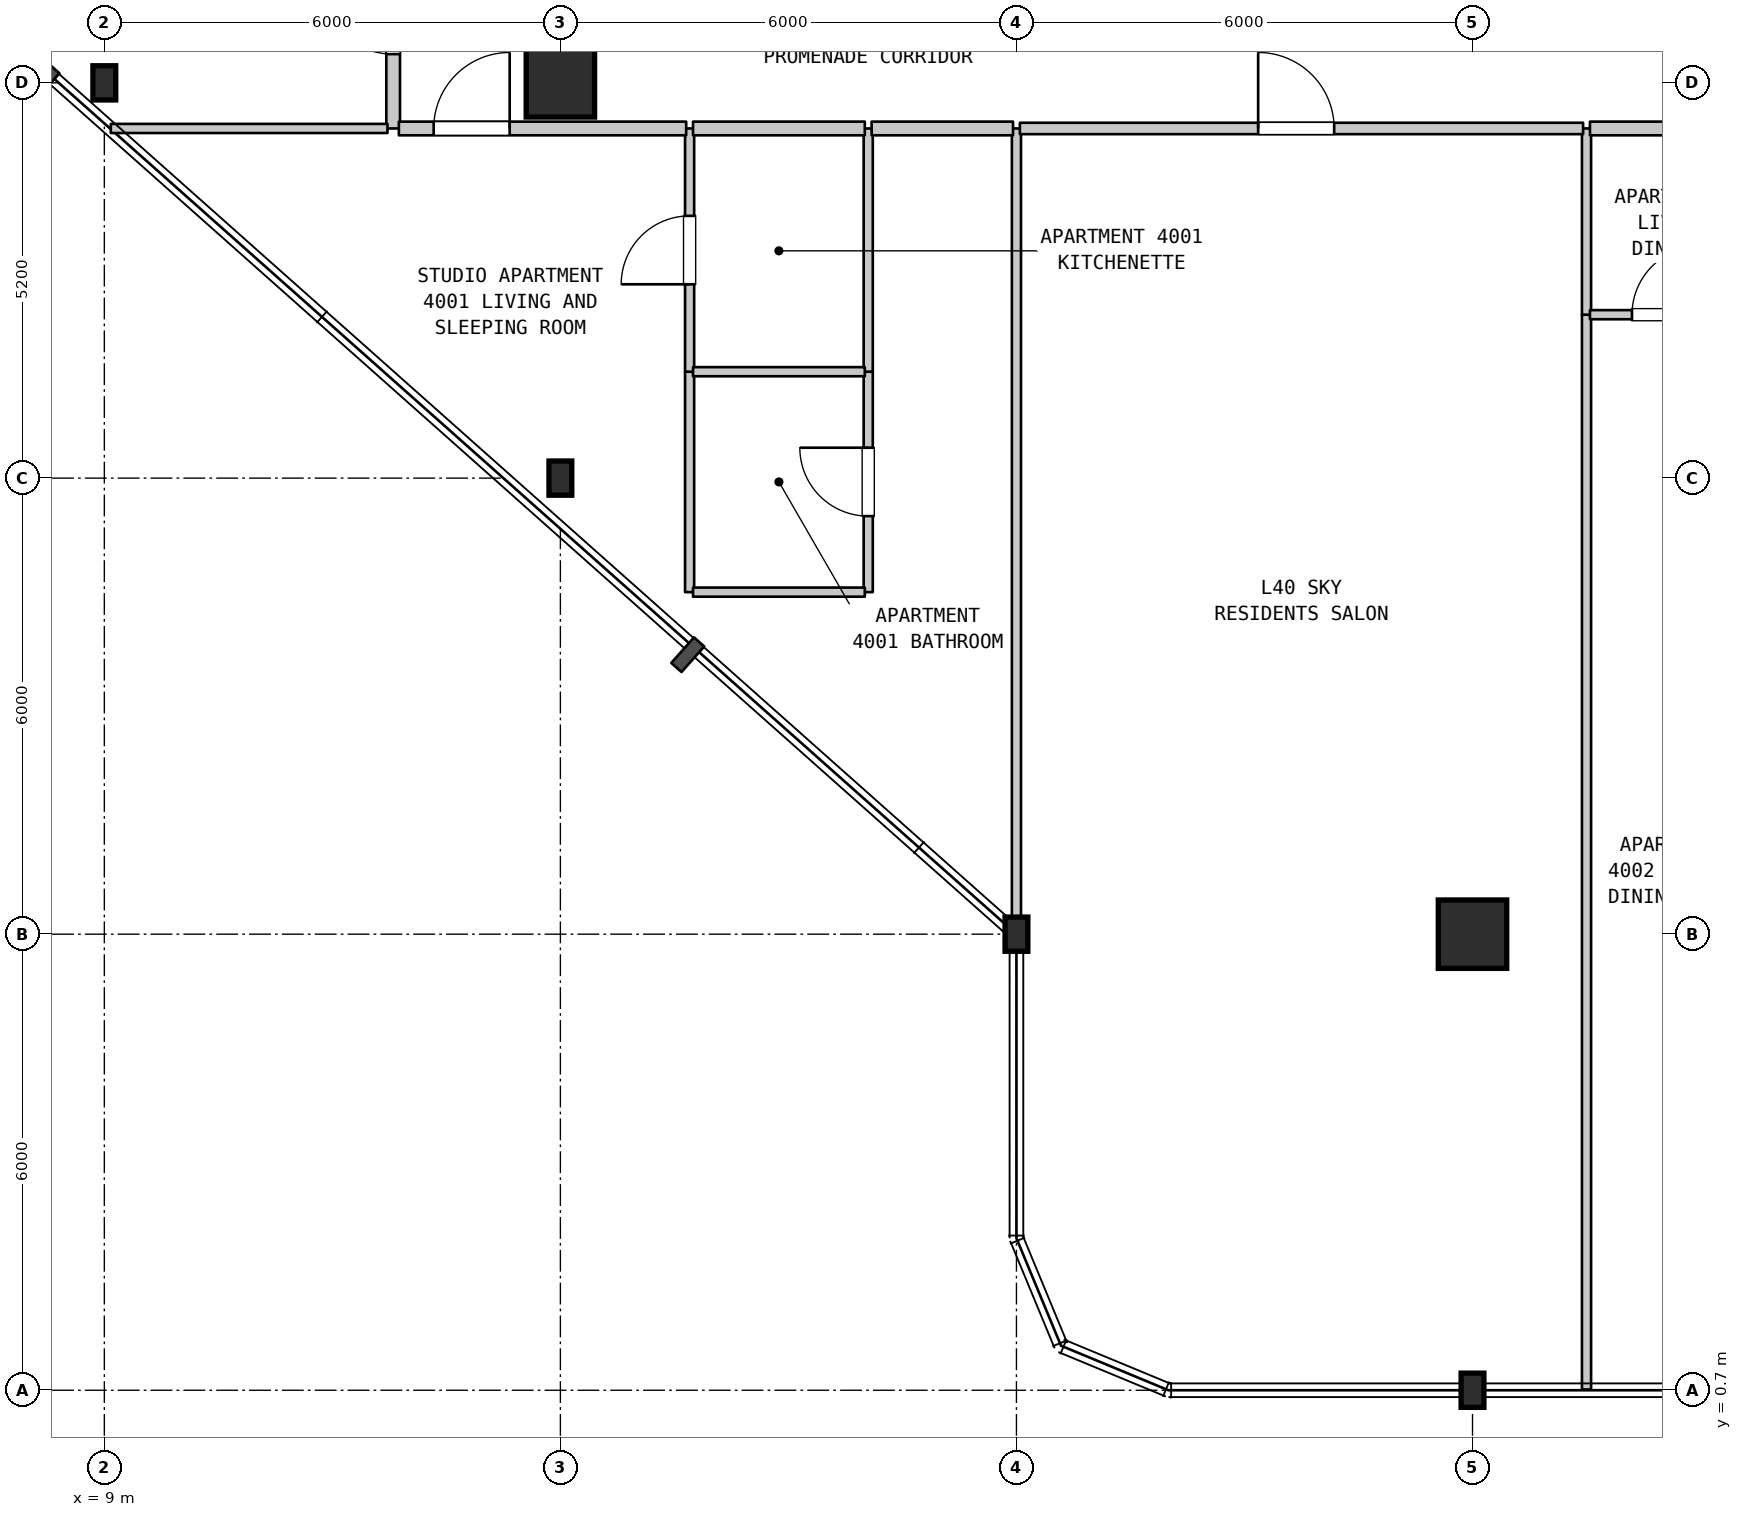
"""IFC4 building model, lengths in metres.
Left out: names, types, materials, properties, quantities, classifications, styles, units other than length and angle.
Written with IfcOpenShell. Run it as: python <this file> out.ifc"""

import sys

from ifc_helpers import new_model, si_unit, direction, frame, frame_2d, origin, origin_2d, place, context, subcontext, project, spatial, rectangle, i_section, extrude, element, fill, save


model = new_model("IFC4")
c1 = context("Model", 3, precision=1e-05, world=origin(), true_north=direction((0.0, 1.0)))
c2 = subcontext(c1, "Body", "Model", "MODEL_VIEW")
j1 = project(units=[si_unit("LENGTHUNIT", "METRE"), si_unit("PLANEANGLEUNIT", "RADIAN")], contexts=[c1])
p1 = place(None, origin())
s1 = spatial("IfcSite", under=j1, at=p1, CompositionType="ELEMENT")
p2 = place(p1, origin())
s2 = spatial("IfcBuilding", under=s1, at=p2, CompositionType="ELEMENT")
p3 = place(p2, frame((0.0, 0.0, 164.6)))
s3 = spatial("IfcBuildingStorey", under=s2, at=p3, CompositionType="ELEMENT", Elevation=164.6)
for number, where, z_axis, x_axis in (
    (1, (9.0, 17.9, 0.0), (0.0, 0.0, 1.0), (1.0, 0.0, 0.0)),
    (2, (15.0, 12.7, 0.0), (0.0, 0.0, 1.0), (1.0, 0.0, 0.0)),
):
    element("IfcColumn", number, at=place(p3, frame(where, z_axis=z_axis, x_axis=x_axis)), inside=s3, PredefinedType="COLUMN", context=c2, shape_type="SweptSolid", body=[
        extrude(i_section(OverallWidth=0.3, OverallDepth=0.45, WebThickness=0.014, FlangeThickness=0.026, FilletRadius=0.027, at=origin_2d()), origin(), (0.0, 0.0, 1.0), 4.5),
    ])
p4 = place(p3, frame((15.0, 17.9, 0.0), z_axis=(0.0, 0.0, 1.0), x_axis=(1.0, 0.0, 0.0)))
e3 = element("IfcColumn", 3, at=p4, inside=s3, PredefinedType="COLUMN", context=c2, shape_type="SweptSolid", body=[
    extrude(rectangle(XDim=0.9, YDim=0.9, at=origin_2d()), origin(), (0.0, 0.0, 1.0), 4.5),
])
for number, where, z_axis, x_axis in (
    (4, (21.0, 6.7, 0.0), (0.0, 0.0, 1.0), (1.0, 0.0, 0.0)),
    (5, (27.0, 0.7, 0.0), (0.0, 0.0, 1.0), (1.0, 0.0, 0.0)),
):
    element("IfcColumn", number, at=place(p3, frame(where, z_axis=z_axis, x_axis=x_axis)), inside=s3, PredefinedType="COLUMN", context=c2, shape_type="SweptSolid", body=[
        extrude(i_section(OverallWidth=0.3, OverallDepth=0.45, WebThickness=0.014, FlangeThickness=0.026, FilletRadius=0.027, at=origin_2d()), origin(), (0.0, 0.0, 1.0), 4.5),
    ])
p5 = place(p3, frame((27.0, 6.7, 0.0), z_axis=(0.0, 0.0, 1.0), x_axis=(1.0, 0.0, 0.0)))
e6 = element("IfcColumn", 6, at=p5, inside=s3, PredefinedType="COLUMN", context=c2, shape_type="SweptSolid", body=[
    extrude(rectangle(XDim=0.9, YDim=0.9, at=origin_2d()), origin(), (0.0, 0.0, 1.0), 4.5),
])
p6 = place(p3, frame((12.8, 17.3, 0.0), z_axis=(0.0, 0.0, 1.0), x_axis=(0.0, 1.0, 0.0)))
e7 = element("IfcWall", 7, at=p6, inside=s3, PredefinedType="STANDARD", context=c2, shape_type="SweptSolid", body=[
    extrude(rectangle(XDim=3.1, YDim=0.18, at=frame_2d((1.55, 0.0))), origin(), (0.0, 0.0, 1.0), 4.19),
])
p7 = place(p6, frame((0.978, 0.0, 0.0)))
e8 = element("IfcOpeningElement", 8, at=p7, cuts=e7, PredefinedType="OPENING", context=c2, shape_type="SweptSolid", body=[
    extrude(rectangle(XDim=1.0, YDim=2.15, at=frame_2d((0.5, 1.075))), frame((0.0, 0.1, 0.0), z_axis=(0.0, -1.0, 0.0), x_axis=(1.0, 0.0, 0.0)), (0.0, 0.0, 1.0), 0.2),
])
p8 = place(p3, frame((16.7, 11.2, 0.0), z_axis=(0.0, 0.0, 1.0), x_axis=(0.0, 1.0, 0.0)))
e9 = element("IfcWall", 9, at=p8, inside=s3, PredefinedType="PARTITIONING", context=c2, shape_type="SweptSolid", body=[
    extrude(rectangle(XDim=2.9, YDim=0.12, at=frame_2d((1.45, 0.0))), origin(), (0.0, 0.0, 1.0), 4.19),
])
p9 = place(p3, frame((16.7, 14.1, 0.0), z_axis=(0.0, 0.0, 1.0), x_axis=(0.0, 1.0, 0.0)))
e10 = element("IfcWall", 10, at=p9, inside=s3, PredefinedType="PARTITIONING", context=c2, shape_type="SweptSolid", body=[
    extrude(rectangle(XDim=3.2, YDim=0.12, at=frame_2d((1.6, 0.0))), origin(), (0.0, 0.0, 1.0), 4.19),
])
p10 = place(p9, frame((1.15, 0.0, 0.0)))
e11 = element("IfcOpeningElement", 11, at=p10, cuts=e10, PredefinedType="OPENING", context=c2, shape_type="SweptSolid", body=[
    extrude(rectangle(XDim=0.9, YDim=2.15, at=frame_2d((0.45, 1.075))), frame((0.0, 0.07, 0.0), z_axis=(0.0, -1.0, 0.0), x_axis=(1.0, 0.0, 0.0)), (0.0, 0.0, 1.0), 0.14),
])
p11 = place(p3, frame((19.05, 11.2, 0.0), z_axis=(0.0, 0.0, 1.0), x_axis=(0.0, 1.0, 0.0)))
e12 = element("IfcWall", 12, at=p11, inside=s3, PredefinedType="PARTITIONING", context=c2, shape_type="SweptSolid", body=[
    extrude(rectangle(XDim=2.9, YDim=0.12, at=frame_2d((1.45, 0.0))), origin(), (0.0, 0.0, 1.0), 4.19),
])
p12 = place(p11, frame((1.0, 0.0, 0.0)))
e13 = element("IfcOpeningElement", 13, at=p12, cuts=e12, PredefinedType="OPENING", context=c2, shape_type="SweptSolid", body=[
    extrude(rectangle(XDim=0.9, YDim=2.1, at=frame_2d((0.45, 1.05))), frame((0.0, 0.07, 0.0), z_axis=(0.0, -1.0, 0.0), x_axis=(1.0, 0.0, 0.0)), (0.0, 0.0, 1.0), 0.14),
])
p13 = place(p3, frame((19.05, 14.1, 0.0), z_axis=(0.0, 0.0, 1.0), x_axis=(0.0, 1.0, 0.0)))
e14 = element("IfcWall", 14, at=p13, inside=s3, PredefinedType="PARTITIONING", context=c2, shape_type="SweptSolid", body=[
    extrude(rectangle(XDim=3.2, YDim=0.12, at=frame_2d((1.6, 0.0))), origin(), (0.0, 0.0, 1.0), 4.19),
])
p14 = place(p3, frame((21.0, 6.71, 0.0), z_axis=(0.0, 0.0, 1.0), x_axis=(0.0, 1.0, 0.0)))
e15 = element("IfcWall", 15, at=p14, inside=s3, PredefinedType="PARTITIONING", context=c2, shape_type="SweptSolid", body=[
    extrude(rectangle(XDim=10.59, YDim=0.12, at=frame_2d((5.295, 0.0))), origin(), (0.0, 0.0, 1.0), 4.19),
])
p15 = place(p3, frame((28.5, 0.71, 0.0), z_axis=(0.0, 0.0, 1.0), x_axis=(0.0, 1.0, 0.0)))
e16 = element("IfcWall", 16, at=p15, inside=s3, PredefinedType="PARTITIONING", context=c2, shape_type="SweptSolid", body=[
    extrude(rectangle(XDim=14.14, YDim=0.12, at=frame_2d((7.07, 0.0))), origin(), (0.0, 0.0, 1.0), 4.19),
])
p16 = place(p3, frame((28.5, 14.85, 0.0), z_axis=(0.0, 0.0, 1.0), x_axis=(0.0, 1.0, 0.0)))
e17 = element("IfcWall", 17, at=p16, inside=s3, PredefinedType="PARTITIONING", context=c2, shape_type="SweptSolid", body=[
    extrude(rectangle(XDim=2.45, YDim=0.12, at=frame_2d((1.225, 0.0))), origin(), (0.0, 0.0, 1.0), 4.19),
])
for number, where, z_axis, x_axis in (
    (18, (16.745, 11.2, 0.0), (0.0, 0.0, 1.0), (1.0, 0.0, 0.0)),
    (19, (16.745, 14.1, 0.0), (0.0, 0.0, 1.0), (1.0, 0.0, 0.0)),
):
    element("IfcWall", number, at=place(p3, frame(where, z_axis=z_axis, x_axis=x_axis)), inside=s3, PredefinedType="PARTITIONING", context=c2, shape_type="SweptSolid", body=[
        extrude(rectangle(XDim=2.26, YDim=0.12, at=frame_2d((1.13, 0.0))), origin(), (0.0, 0.0, 1.0), 4.19),
    ])
p17 = place(p3, frame((28.545, 14.85, 0.0), z_axis=(0.0, 0.0, 1.0), x_axis=(1.0, 0.0, 0.0)))
e20 = element("IfcWall", 20, at=p17, inside=s3, PredefinedType="PARTITIONING", context=c2, shape_type="SweptSolid", body=[
    extrude(rectangle(XDim=2.16, YDim=0.12, at=frame_2d((1.08, 0.0))), origin(), (0.0, 0.0, 1.0), 4.19),
])
p18 = place(p17, frame((0.553, 0.0, 0.0)))
e21 = element("IfcOpeningElement", 21, at=p18, cuts=e20, PredefinedType="OPENING", context=c2, shape_type="SweptSolid", body=[
    extrude(rectangle(XDim=0.9, YDim=2.15, at=frame_2d((0.45, 1.075))), frame((0.0, 0.07, 0.0), z_axis=(0.0, -1.0, 0.0), x_axis=(1.0, 0.0, 0.0)), (0.0, 0.0, 1.0), 0.14),
])
p19 = place(p3, frame((9.085, 17.3, 0.0), z_axis=(0.0, 0.0, 1.0), x_axis=(1.0, 0.0, 0.0)))
e22 = element("IfcWall", 22, at=p19, inside=s3, PredefinedType="PARTITIONING", context=c2, shape_type="SweptSolid", body=[
    extrude(rectangle(XDim=3.64, YDim=0.12, at=frame_2d((1.82, 0.0))), origin(), (0.0, 0.0, 1.0), 4.19),
])
p20 = place(p3, frame((12.875, 17.3, 0.0), z_axis=(0.0, 0.0, 1.0), x_axis=(1.0, 0.0, 0.0)))
e23 = element("IfcWall", 23, at=p20, inside=s3, PredefinedType="STANDARD", context=c2, shape_type="SweptSolid", body=[
    extrude(rectangle(XDim=3.78, YDim=0.18, at=frame_2d((1.89, 0.0))), origin(), (0.0, 0.0, 1.0), 4.19),
])
p21 = place(p20, frame((0.458, 0.0, 0.0)))
e24 = element("IfcOpeningElement", 24, at=p21, cuts=e23, PredefinedType="OPENING", context=c2, shape_type="SweptSolid", body=[
    extrude(rectangle(XDim=1.0, YDim=2.15, at=frame_2d((0.5, 1.075))), frame((0.0, 0.1, 0.0), z_axis=(0.0, -1.0, 0.0), x_axis=(1.0, 0.0, 0.0)), (0.0, 0.0, 1.0), 0.2),
])
p22 = place(p3, frame((16.745, 17.3, 0.0), z_axis=(0.0, 0.0, 1.0), x_axis=(1.0, 0.0, 0.0)))
e25 = element("IfcWall", 25, at=p22, inside=s3, PredefinedType="STANDARD", context=c2, shape_type="SweptSolid", body=[
    extrude(rectangle(XDim=2.26, YDim=0.18, at=frame_2d((1.13, 0.0))), origin(), (0.0, 0.0, 1.0), 4.19),
])
p23 = place(p3, frame((19.095, 17.3, 0.0), z_axis=(0.0, 0.0, 1.0), x_axis=(1.0, 0.0, 0.0)))
e26 = element("IfcWall", 26, at=p23, inside=s3, PredefinedType="STANDARD", context=c2, shape_type="SweptSolid", body=[
    extrude(rectangle(XDim=1.86, YDim=0.18, at=frame_2d((0.93, 0.0))), origin(), (0.0, 0.0, 1.0), 4.19),
])
p24 = place(p3, frame((21.045, 17.3, 0.0), z_axis=(0.0, 0.0, 1.0), x_axis=(1.0, 0.0, 0.0)))
e27 = element("IfcWall", 27, at=p24, inside=s3, PredefinedType="STANDARD", context=c2, shape_type="SweptSolid", body=[
    extrude(rectangle(XDim=7.41, YDim=0.15, at=frame_2d((3.705, 0.0))), origin(), (0.0, 0.0, 1.0), 4.19),
])
p25 = place(p24, frame((3.135, 0.0, 0.0)))
e28 = element("IfcOpeningElement", 28, at=p25, cuts=e27, PredefinedType="OPENING", context=c2, shape_type="SweptSolid", body=[
    extrude(rectangle(XDim=1.0, YDim=2.15, at=frame_2d((0.5, 1.075))), frame((0.0, 0.085, 0.0), z_axis=(0.0, -1.0, 0.0), x_axis=(1.0, 0.0, 0.0)), (0.0, 0.0, 1.0), 0.17),
])
p26 = place(p3, frame((28.545, 17.3, 0.0), z_axis=(0.0, 0.0, 1.0), x_axis=(1.0, 0.0, 0.0)))
e29 = element("IfcWall", 29, at=p26, inside=s3, PredefinedType="STANDARD", context=c2, shape_type="SweptSolid", body=[
    extrude(rectangle(XDim=4.72, YDim=0.18, at=frame_2d((2.36, 0.0))), origin(), (0.0, 0.0, 1.0), 4.19),
])
p27 = place(p26, frame((1.788, 0.0, 0.0)))
e30 = element("IfcOpeningElement", 30, at=p27, cuts=e29, PredefinedType="OPENING", context=c2, shape_type="SweptSolid", body=[
    extrude(rectangle(XDim=1.0, YDim=2.15, at=frame_2d((0.5, 1.075))), frame((0.0, 0.1, 0.0), z_axis=(0.0, -1.0, 0.0), x_axis=(1.0, 0.0, 0.0)), (0.0, 0.0, 1.0), 0.2),
])
p28 = place(p7, origin())
e31 = element("IfcDoor", 31, at=p28, inside=s3, OperationType="SINGLE_SWING_RIGHT", PredefinedType="DOOR", context=c2, shape_type="SweptSolid", body=[
    extrude(rectangle(XDim=1.0, YDim=2.15, at=frame_2d((0.5, 1.075))), frame((0.0, 0.025, 0.0), z_axis=(0.0, -1.0, 0.0), x_axis=(1.0, 0.0, 0.0)), (0.0, 0.0, 1.0), 0.05),
])
fill(e8, e31)
p29 = place(p10, origin())
e32 = element("IfcDoor", 32, at=p29, inside=s3, OperationType="SINGLE_SWING_LEFT", PredefinedType="DOOR", context=c2, shape_type="SweptSolid", body=[
    extrude(rectangle(XDim=0.9, YDim=2.15, at=frame_2d((0.45, 1.075))), frame((0.0, 0.025, 0.0), z_axis=(0.0, -1.0, 0.0), x_axis=(1.0, 0.0, 0.0)), (0.0, 0.0, 1.0), 0.05),
])
fill(e11, e32)
p30 = place(p12, origin())
e33 = element("IfcDoor", 33, at=p30, inside=s3, OperationType="SINGLE_SWING_RIGHT", PredefinedType="DOOR", context=c2, shape_type="SweptSolid", body=[
    extrude(rectangle(XDim=0.9, YDim=2.1, at=frame_2d((0.45, 1.05))), frame((0.0, 0.025, 0.0), z_axis=(0.0, -1.0, 0.0), x_axis=(1.0, 0.0, 0.0)), (0.0, 0.0, 1.0), 0.05),
])
fill(e13, e33)
p31 = place(p18, origin())
e34 = element("IfcDoor", 34, at=p31, inside=s3, OperationType="SINGLE_SWING_RIGHT", PredefinedType="DOOR", context=c2, shape_type="SweptSolid", body=[
    extrude(rectangle(XDim=0.9, YDim=2.15, at=frame_2d((0.45, 1.075))), frame((0.0, 0.025, 0.0), z_axis=(0.0, -1.0, 0.0), x_axis=(1.0, 0.0, 0.0)), (0.0, 0.0, 1.0), 0.05),
])
fill(e21, e34)
p32 = place(p21, origin())
e35 = element("IfcDoor", 35, at=p32, inside=s3, OperationType="SINGLE_SWING_RIGHT", PredefinedType="DOOR", context=c2, shape_type="SweptSolid", body=[
    extrude(rectangle(XDim=1.0, YDim=2.15, at=frame_2d((0.5, 1.075))), frame((0.0, 0.025, 0.0), z_axis=(0.0, -1.0, 0.0), x_axis=(1.0, 0.0, 0.0)), (0.0, 0.0, 1.0), 0.05),
])
fill(e24, e35)
p33 = place(p25, origin())
e36 = element("IfcDoor", 36, at=p33, inside=s3, OperationType="SINGLE_SWING_LEFT", PredefinedType="DOOR", context=c2, shape_type="SweptSolid", body=[
    extrude(rectangle(XDim=1.0, YDim=2.15, at=frame_2d((0.5, 1.075))), frame((0.0, 0.025, 0.0), z_axis=(0.0, -1.0, 0.0), x_axis=(1.0, 0.0, 0.0)), (0.0, 0.0, 1.0), 0.05),
])
fill(e28, e36)
save(model, sys.argv[1])
